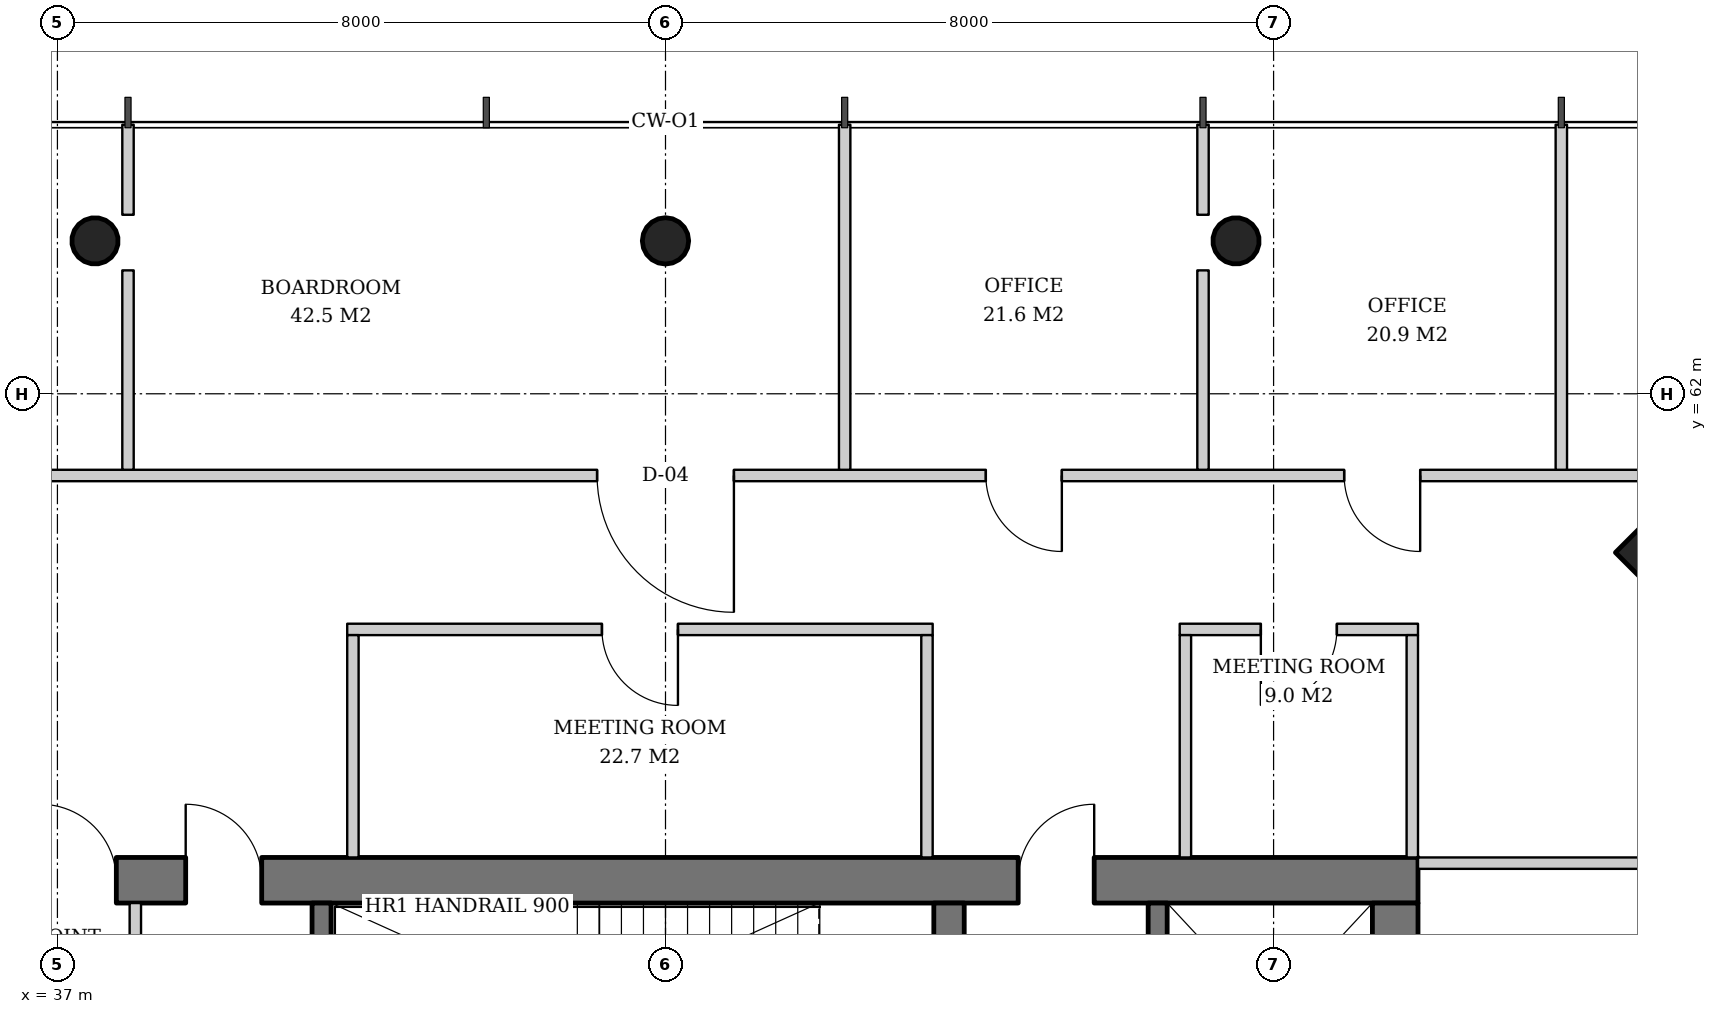
"""IFC4 building model, lengths in metres.
Left out: names, types, materials, properties, quantities, classifications, styles, units other than length and angle.
Written with IfcOpenShell. Run it as: python <this file> out.ifc"""

import sys

from ifc_helpers import new_model, si_unit, direction, frame, frame_2d, origin, origin_2d, place, context, subcontext, project, spatial, rectangle, hollow_circle, extrude, element, fill, save


model = new_model("IFC4")
c1 = context("Model", 3, precision=1e-05, world=origin(), true_north=direction((0.0, 1.0)))
c2 = subcontext(c1, "Body", "Model", "MODEL_VIEW")
j1 = project(units=[si_unit("LENGTHUNIT", "METRE"), si_unit("PLANEANGLEUNIT", "RADIAN")], contexts=[c1])
p1 = place(None, origin())
s1 = spatial("IfcSite", under=j1, at=p1, CompositionType="ELEMENT")
p2 = place(p1, origin())
s2 = spatial("IfcBuilding", under=s1, at=p2, CompositionType="ELEMENT")
p3 = place(p2, frame((0.0, 0.0, 207.2)))
s3 = spatial("IfcBuildingStorey", under=s2, at=p3, CompositionType="ELEMENT", Elevation=207.2)
p4 = place(p3, frame((58.95, 59.95, 0.0), z_axis=(-0.031898107953, -0.031898107953, 0.998981992539), x_axis=(0.707106781187, -0.707106781187, 0.0)))
e1 = element("IfcColumn", 1, at=p4, inside=s3, PredefinedType="COLUMN", context=c2, shape_type="SweptSolid", body=[
    extrude(rectangle(XDim=2.0, YDim=2.0, at=origin_2d()), origin(), (0.0, 0.0, 1.0), 3.804),
])
p5 = place(p3, frame((52.525, 64.05, 0.0), z_axis=(-0.015923015547, -0.031974442509, 0.999361842679), x_axis=(0.895145027055, -0.445775033553, 0.0)))
e2 = element("IfcColumn", 2, at=p5, inside=s3, PredefinedType="COLUMN", context=c2, shape_type="SweptSolid", body=[
    extrude(hollow_circle(Radius=0.305, WallThickness=0.025, at=origin_2d()), origin(), (0.0, 0.0, 1.0), 3.802),
])
p6 = place(p3, frame((45.0, 64.05, 0.0), z_axis=(0.0, -0.031978496719, 0.999488557087), x_axis=(1.0, 0.0, 0.0)))
e3 = element("IfcColumn", 3, at=p6, inside=s3, PredefinedType="COLUMN", context=c2, shape_type="SweptSolid", body=[
    extrude(hollow_circle(Radius=0.305, WallThickness=0.025, at=origin_2d()), origin(), (0.0, 0.0, 1.0), 3.802),
])
p7 = place(p3, frame((37.475, 64.05, 0.0), z_axis=(0.015923015547, -0.031974442509, 0.999361842679), x_axis=(0.895145027055, 0.445775033553, 0.0)))
e4 = element("IfcColumn", 4, at=p7, inside=s3, PredefinedType="COLUMN", context=c2, shape_type="SweptSolid", body=[
    extrude(hollow_circle(Radius=0.305, WallThickness=0.025, at=origin_2d()), origin(), (0.0, 0.0, 1.0), 3.802),
])
p8 = place(p3, frame((35.1, 55.6, 0.0), z_axis=(0.0, 0.0, 1.0), x_axis=(1.0, 0.0, 0.0)))
e5 = element("IfcWall", 5, at=p8, inside=s3, PredefinedType="SHEAR", context=c2, shape_type="SweptSolid", body=[
    extrude(rectangle(XDim=19.8, YDim=0.6, at=frame_2d((9.9, 0.0))), origin(), (0.0, 0.0, 1.0), 3.8),
])
p9 = place(p8, frame((14.54, 0.0, 0.0)))
e6 = element("IfcOpeningElement", 6, at=p9, cuts=e5, PredefinedType="OPENING", context=c2, shape_type="SweptSolid", body=[
    extrude(rectangle(XDim=1.0, YDim=2.1, at=frame_2d((0.5, 1.05))), frame((0.0, 0.31, 0.0), z_axis=(0.0, -1.0, 0.0), x_axis=(1.0, 0.0, 0.0)), (0.0, 0.0, 1.0), 0.62),
])
p10 = place(p8, frame((1.675, 0.0, 0.0)))
e7 = element("IfcOpeningElement", 7, at=p10, cuts=e5, PredefinedType="OPENING", context=c2, shape_type="SweptSolid", body=[
    extrude(rectangle(XDim=1.0, YDim=2.1, at=frame_2d((0.5, 1.05))), frame((0.0, 0.31, 0.0), z_axis=(0.0, -1.0, 0.0), x_axis=(1.0, 0.0, 0.0)), (0.0, 0.0, 1.0), 0.62),
])
p11 = place(p8, frame((3.587, 0.0, 0.0)))
e8 = element("IfcOpeningElement", 8, at=p11, cuts=e5, PredefinedType="OPENING", context=c2, shape_type="SweptSolid", body=[
    extrude(rectangle(XDim=1.0, YDim=2.1, at=frame_2d((0.5, 1.05))), frame((0.0, 0.31, 0.0), z_axis=(0.0, -1.0, 0.0), x_axis=(1.0, 0.0, 0.0)), (0.0, 0.0, 1.0), 0.62),
])
p12 = place(p3, frame((54.6, 36.7, 0.0), z_axis=(0.0, 0.0, 1.0), x_axis=(0.0, 1.0, 0.0)))
e9 = element("IfcWall", 9, at=p12, inside=s3, PredefinedType="SHEAR", context=c2, shape_type="SweptSolid", body=[
    extrude(rectangle(XDim=18.6, YDim=0.6, at=frame_2d((9.3, 0.0))), origin(), (0.0, 0.0, 1.0), 3.8),
])
p13 = place(p12, frame((8.4, 0.0, 0.0)))
e10 = element("IfcOpeningElement", 10, at=p13, cuts=e9, PredefinedType="OPENING", context=c2, shape_type="SweptSolid", body=[
    extrude(rectangle(XDim=1.8, YDim=2.4, at=frame_2d((0.9, 1.2))), frame((0.0, 0.31, 0.0), z_axis=(0.0, -1.0, 0.0), x_axis=(1.0, 0.0, 0.0)), (0.0, 0.0, 1.0), 0.62),
])
p14 = place(p3, frame((48.73, 52.4, 0.0), z_axis=(0.0, 0.0, 1.0), x_axis=(0.0, 1.0, 0.0)))
e11 = element("IfcWall", 11, at=p14, inside=s3, PredefinedType="SHEAR", context=c2, shape_type="SweptSolid", body=[
    extrude(rectangle(XDim=2.9, YDim=0.4, at=frame_2d((1.45, 0.0))), origin(), (0.0, 0.0, 1.0), 3.8),
])
p15 = place(p14, frame((0.3, 0.0, 0.0)))
e12 = element("IfcOpeningElement", 12, at=p15, cuts=e11, PredefinedType="OPENING", context=c2, shape_type="SweptSolid", body=[
    extrude(rectangle(XDim=1.0, YDim=2.1, at=frame_2d((0.5, 1.05))), frame((0.0, 0.21, 0.0), z_axis=(0.0, -1.0, 0.0), x_axis=(1.0, 0.0, 0.0)), (0.0, 0.0, 1.0), 0.42),
])
p16 = place(p3, frame((40.475, 52.4, 0.0), z_axis=(0.0, 0.0, 1.0), x_axis=(0.0, 1.0, 0.0)))
e13 = element("IfcWall", 13, at=p16, inside=s3, PredefinedType="SHEAR", context=c2, shape_type="SweptSolid", body=[
    extrude(rectangle(XDim=2.9, YDim=0.25, at=frame_2d((1.45, 0.0))), origin(), (0.0, 0.0, 1.0), 3.8),
])
p17 = place(p3, frame((51.475, 52.4, 0.0), z_axis=(0.0, 0.0, 1.0), x_axis=(0.0, 1.0, 0.0)))
e14 = element("IfcWall", 14, at=p17, inside=s3, PredefinedType="SHEAR", context=c2, shape_type="SweptSolid", body=[
    extrude(rectangle(XDim=2.9, YDim=0.25, at=frame_2d((1.45, 0.0))), origin(), (0.0, 0.0, 1.0), 3.8),
])
p18 = place(p17, frame((0.8, 0.0, 0.0)))
e15 = element("IfcOpeningElement", 15, at=p18, cuts=e14, PredefinedType="OPENING", context=c2, shape_type="SweptSolid", body=[
    extrude(rectangle(XDim=1.3, YDim=2.2, at=frame_2d((0.65, 1.1))), frame((0.0, 0.135, 0.0), z_axis=(0.0, -1.0, 0.0), x_axis=(1.0, 0.0, 0.0)), (0.0, 0.0, 1.0), 0.27),
])
p19 = place(p3, frame((38.025, 52.4, 0.0), z_axis=(0.0, 0.0, 1.0), x_axis=(0.0, 1.0, 0.0)))
e16 = element("IfcWall", 16, at=p19, inside=s3, PredefinedType="SOLIDWALL", context=c2, shape_type="SweptSolid", body=[
    extrude(rectangle(XDim=2.9, YDim=0.15, at=frame_2d((1.45, 0.0))), origin(), (0.0, 0.0, 1.0), 3.62),
])
p20 = place(p3, frame((54.9, 55.825, 0.0), z_axis=(0.0, 0.0, 1.0), x_axis=(1.0, 0.0, 0.0)))
e17 = element("IfcWall", 17, at=p20, inside=s3, PredefinedType="PARTITIONING", context=c2, shape_type="SweptSolid", body=[
    extrude(rectangle(XDim=2.925, YDim=0.15, at=frame_2d((1.462, 0.0))), origin(), (0.0, 0.0, 1.0), 3.62),
])
p21 = place(p3, frame((54.9, 58.9, 0.0), z_axis=(0.0, 0.0, 1.0), x_axis=(-1.0, 0.0, 0.0)))
e18 = element("IfcWall", 18, at=p21, inside=s3, PredefinedType="PARTITIONING", context=c2, shape_type="SweptSolid", body=[
    extrude(rectangle(XDim=3.135, YDim=0.15, at=frame_2d((1.567, 0.0))), origin(), (0.0, 0.0, 1.0), 2.92),
])
p22 = place(p21, frame((1.067, 0.0, 0.0)))
e19 = element("IfcOpeningElement", 19, at=p22, cuts=e18, PredefinedType="OPENING", context=c2, shape_type="SweptSolid", body=[
    extrude(rectangle(XDim=1.0, YDim=2.1, at=frame_2d((0.5, 1.05))), frame((0.0, 0.085, 0.0), z_axis=(0.0, -1.0, 0.0), x_axis=(1.0, 0.0, 0.0)), (0.0, 0.0, 1.0), 0.17),
])
p23 = place(p3, frame((54.825, 55.9, 0.0), z_axis=(0.0, 0.0, 1.0), x_axis=(0.0, 1.0, 0.0)))
e20 = element("IfcWall", 20, at=p23, inside=s3, PredefinedType="PARTITIONING", context=c2, shape_type="SweptSolid", body=[
    extrude(rectangle(XDim=2.925, YDim=0.15, at=frame_2d((1.462, 0.0))), origin(), (0.0, 0.0, 1.0), 2.867),
])
p24 = place(p3, frame((51.84, 55.9, 0.0), z_axis=(0.0, 0.0, 1.0), x_axis=(0.0, 1.0, 0.0)))
e21 = element("IfcWall", 21, at=p24, inside=s3, PredefinedType="PARTITIONING", context=c2, shape_type="SweptSolid", body=[
    extrude(rectangle(XDim=2.925, YDim=0.15, at=frame_2d((1.462, 0.0))), origin(), (0.0, 0.0, 1.0), 3.62),
])
p25 = place(p3, frame((48.515, 58.9, 0.0), z_axis=(0.0, 0.0, 1.0), x_axis=(-1.0, 0.0, 0.0)))
e22 = element("IfcWall", 22, at=p25, inside=s3, PredefinedType="PARTITIONING", context=c2, shape_type="SweptSolid", body=[
    extrude(rectangle(XDim=7.702, YDim=0.15, at=frame_2d((3.851, 0.0))), origin(), (0.0, 0.0, 1.0), 2.867),
])
p26 = place(p25, frame((3.351, 0.0, 0.0)))
e23 = element("IfcOpeningElement", 23, at=p26, cuts=e22, PredefinedType="OPENING", context=c2, shape_type="SweptSolid", body=[
    extrude(rectangle(XDim=1.0, YDim=2.1, at=frame_2d((0.5, 1.05))), frame((0.0, 0.085, 0.0), z_axis=(0.0, -1.0, 0.0), x_axis=(1.0, 0.0, 0.0)), (0.0, 0.0, 1.0), 0.17),
])
for number, where, z_axis, x_axis in (
    (24, (48.44, 55.9, 0.0), (0.0, 0.0, 1.0), (0.0, 1.0, 0.0)),
    (25, (40.887, 55.9, 0.0), (0.0, 0.0, 1.0), (0.0, 1.0, 0.0)),
):
    element("IfcWall", number, at=place(p3, frame(where, z_axis=z_axis, x_axis=x_axis)), inside=s3, PredefinedType="PARTITIONING", context=c2, shape_type="SweptSolid", body=[
        extrude(rectangle(XDim=2.925, YDim=0.15, at=frame_2d((1.462, 0.0))), origin(), (0.0, 0.0, 1.0), 3.62),
    ])
p27 = place(p3, frame((58.436, 60.925, 0.0), z_axis=(0.0, 0.0, 1.0), x_axis=(-1.0, 0.0, 0.0)))
e26 = element("IfcWall", 26, at=p27, inside=s3, PredefinedType="PARTITIONING", context=c2, shape_type="SweptSolid", body=[
    extrude(rectangle(XDim=26.872, YDim=0.15, at=frame_2d((13.436, 0.0))), origin(), (0.0, 0.0, 1.0), 2.867),
])
p28 = place(p27, frame((3.507, 0.0, 0.0)))
e27 = element("IfcOpeningElement", 27, at=p28, cuts=e26, PredefinedType="OPENING", context=c2, shape_type="SweptSolid", body=[
    extrude(rectangle(XDim=1.0, YDim=2.1, at=frame_2d((0.5, 1.05))), frame((0.0, 0.085, 0.0), z_axis=(0.0, -1.0, 0.0), x_axis=(1.0, 0.0, 0.0)), (0.0, 0.0, 1.0), 0.17),
])
p29 = place(p27, frame((8.221, 0.0, 0.0)))
e28 = element("IfcOpeningElement", 28, at=p29, cuts=e26, PredefinedType="OPENING", context=c2, shape_type="SweptSolid", body=[
    extrude(rectangle(XDim=1.0, YDim=2.1, at=frame_2d((0.5, 1.05))), frame((0.0, 0.085, 0.0), z_axis=(0.0, -1.0, 0.0), x_axis=(1.0, 0.0, 0.0)), (0.0, 0.0, 1.0), 0.17),
])
p30 = place(p27, frame((12.536, 0.0, 0.0)))
e29 = element("IfcOpeningElement", 29, at=p30, cuts=e26, PredefinedType="OPENING", context=c2, shape_type="SweptSolid", body=[
    extrude(rectangle(XDim=1.8, YDim=2.4, at=frame_2d((0.9, 1.2))), frame((0.0, 0.085, 0.0), z_axis=(0.0, -1.0, 0.0), x_axis=(1.0, 0.0, 0.0)), (0.0, 0.0, 1.0), 0.17),
])
p31 = place(p27, frame((22.364, 0.0, 0.0)))
e30 = element("IfcOpeningElement", 30, at=p31, cuts=e26, PredefinedType="OPENING", context=c2, shape_type="SweptSolid", body=[
    extrude(rectangle(XDim=1.0, YDim=2.1, at=frame_2d((0.5, 1.05))), frame((0.0, 0.085, 0.0), z_axis=(0.0, -1.0, 0.0), x_axis=(1.0, 0.0, 0.0)), (0.0, 0.0, 1.0), 0.17),
])
p32 = place(p3, frame((56.786, 61.0, 0.0), z_axis=(0.0, 0.0, 1.0), x_axis=(0.0, 1.0, 0.0)))
e31 = element("IfcWall", 31, at=p32, inside=s3, PredefinedType="PARTITIONING", context=c2, shape_type="SweptSolid", body=[
    extrude(rectangle(XDim=4.54, YDim=0.15, at=frame_2d((2.27, 0.0))), origin(), (0.0, 0.0, 1.0), 3.12),
])
p33 = place(p3, frame((52.072, 61.0, 0.0), z_axis=(0.0, 0.0, 1.0), x_axis=(0.0, 1.0, 0.0)))
e32 = element("IfcWall", 32, at=p33, inside=s3, PredefinedType="PARTITIONING", context=c2, shape_type="SweptSolid", body=[
    extrude(rectangle(XDim=2.624, YDim=0.15, at=frame_2d((1.312, 0.0))), origin(), (0.0, 0.0, 1.0), 3.62),
])
p34 = place(p3, frame((52.072, 64.355, 0.0), z_axis=(0.0, 0.0, 1.0), x_axis=(0.0, 1.0, 0.0)))
e33 = element("IfcWall", 33, at=p34, inside=s3, PredefinedType="PARTITIONING", context=c2, shape_type="SweptSolid", body=[
    extrude(rectangle(XDim=1.185, YDim=0.15, at=frame_2d((0.593, 0.0))), origin(), (0.0, 0.0, 1.0), 3.62),
])
p35 = place(p3, frame((47.357, 61.0, 0.0), z_axis=(0.0, 0.0, 1.0), x_axis=(0.0, 1.0, 0.0)))
e34 = element("IfcWall", 34, at=p35, inside=s3, PredefinedType="PARTITIONING", context=c2, shape_type="SweptSolid", body=[
    extrude(rectangle(XDim=4.54, YDim=0.15, at=frame_2d((2.27, 0.0))), origin(), (0.0, 0.0, 1.0), 3.12),
])
p36 = place(p3, frame((37.928, 61.0, 0.0), z_axis=(0.0, 0.0, 1.0), x_axis=(0.0, 1.0, 0.0)))
e35 = element("IfcWall", 35, at=p36, inside=s3, PredefinedType="PARTITIONING", context=c2, shape_type="SweptSolid", body=[
    extrude(rectangle(XDim=2.624, YDim=0.15, at=frame_2d((1.312, 0.0))), origin(), (0.0, 0.0, 1.0), 3.62),
])
p37 = place(p3, frame((37.928, 64.355, 0.0), z_axis=(0.0, 0.0, 1.0), x_axis=(0.0, 1.0, 0.0)))
e36 = element("IfcWall", 36, at=p37, inside=s3, PredefinedType="PARTITIONING", context=c2, shape_type="SweptSolid", body=[
    extrude(rectangle(XDim=1.185, YDim=0.15, at=frame_2d((0.593, 0.0))), origin(), (0.0, 0.0, 1.0), 3.62),
])
p38 = place(p9, origin())
e37 = element("IfcDoor", 37, at=p38, inside=s3, OperationType="SINGLE_SWING_RIGHT", PredefinedType="DOOR", context=c2, shape_type="SweptSolid", body=[
    extrude(rectangle(XDim=1.0, YDim=2.1, at=frame_2d((0.5, 1.05))), frame((0.0, 0.025, 0.0), z_axis=(0.0, -1.0, 0.0), x_axis=(1.0, 0.0, 0.0)), (0.0, 0.0, 1.0), 0.05),
])
fill(e6, e37)
p39 = place(p10, origin())
e38 = element("IfcDoor", 38, at=p39, inside=s3, OperationType="SINGLE_SWING_LEFT", PredefinedType="DOOR", context=c2, shape_type="SweptSolid", body=[
    extrude(rectangle(XDim=1.0, YDim=2.1, at=frame_2d((0.5, 1.05))), frame((0.0, -0.24, 0.0), z_axis=(0.0, -1.0, 0.0), x_axis=(1.0, 0.0, 0.0)), (0.0, 0.0, 1.0), 0.05),
])
fill(e7, e38)
p40 = place(p11, origin())
e39 = element("IfcDoor", 39, at=p40, inside=s3, OperationType="SINGLE_SWING_LEFT", PredefinedType="DOOR", context=c2, shape_type="SweptSolid", body=[
    extrude(rectangle(XDim=1.0, YDim=2.1, at=frame_2d((0.5, 1.05))), frame((0.0, -0.24, 0.0), z_axis=(0.0, -1.0, 0.0), x_axis=(1.0, 0.0, 0.0)), (0.0, 0.0, 1.0), 0.05),
])
fill(e8, e39)
p41 = place(p22, origin())
e40 = element("IfcDoor", 40, at=p41, inside=s3, OperationType="SINGLE_SWING_RIGHT", PredefinedType="DOOR", context=c2, shape_type="SweptSolid", body=[
    extrude(rectangle(XDim=1.0, YDim=2.1, at=frame_2d((0.5, 1.05))), frame((0.0, 0.025, 0.0), z_axis=(0.0, -1.0, 0.0), x_axis=(1.0, 0.0, 0.0)), (0.0, 0.0, 1.0), 0.05),
])
fill(e19, e40)
p42 = place(p26, origin())
e41 = element("IfcDoor", 41, at=p42, inside=s3, OperationType="SINGLE_SWING_LEFT", PredefinedType="DOOR", context=c2, shape_type="SweptSolid", body=[
    extrude(rectangle(XDim=1.0, YDim=2.1, at=frame_2d((0.5, 1.05))), frame((0.0, 0.025, 0.0), z_axis=(0.0, -1.0, 0.0), x_axis=(1.0, 0.0, 0.0)), (0.0, 0.0, 1.0), 0.05),
])
fill(e23, e41)
p43 = place(p28, origin())
e42 = element("IfcDoor", 42, at=p43, inside=s3, OperationType="SINGLE_SWING_LEFT", PredefinedType="DOOR", context=c2, shape_type="SweptSolid", body=[
    extrude(rectangle(XDim=1.0, YDim=2.1, at=frame_2d((0.5, 1.05))), frame((0.0, 0.025, 0.0), z_axis=(0.0, -1.0, 0.0), x_axis=(1.0, 0.0, 0.0)), (0.0, 0.0, 1.0), 0.05),
])
fill(e27, e42)
p44 = place(p29, origin())
e43 = element("IfcDoor", 43, at=p44, inside=s3, OperationType="SINGLE_SWING_LEFT", PredefinedType="DOOR", context=c2, shape_type="SweptSolid", body=[
    extrude(rectangle(XDim=1.0, YDim=2.1, at=frame_2d((0.5, 1.05))), frame((0.0, 0.025, 0.0), z_axis=(0.0, -1.0, 0.0), x_axis=(1.0, 0.0, 0.0)), (0.0, 0.0, 1.0), 0.05),
])
fill(e28, e43)
p45 = place(p30, origin())
e44 = element("IfcDoor", 44, at=p45, inside=s3, OperationType="DOUBLE_DOOR_SINGLE_SWING", PredefinedType="DOOR", context=c2, shape_type="SweptSolid", body=[
    extrude(rectangle(XDim=1.8, YDim=2.4, at=frame_2d((0.9, 1.2))), frame((0.0, 0.025, 0.0), z_axis=(0.0, -1.0, 0.0), x_axis=(1.0, 0.0, 0.0)), (0.0, 0.0, 1.0), 0.05),
])
fill(e29, e44)
save(model, sys.argv[1])
